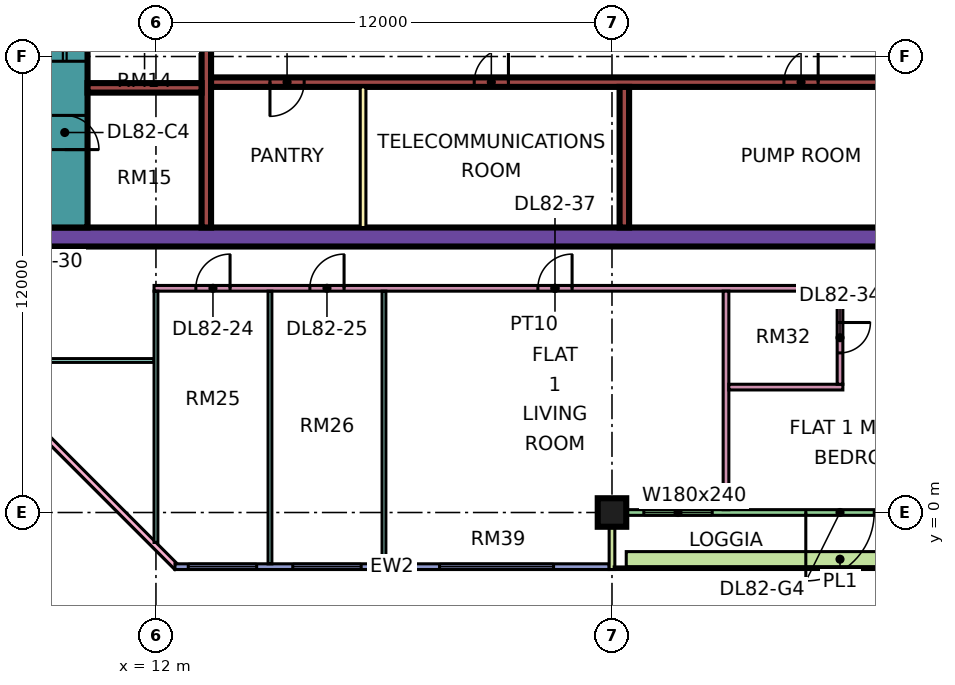
"""IFC4 building model, lengths in metres.
Left out: names, types, materials, properties, quantities, classifications, styles, units other than length and angle.
Written with IfcOpenShell. Run it as: python <this file> out.ifc"""

import sys

from ifc_helpers import new_model, si_unit, direction, frame, frame_2d, origin, origin_2d, place, context, subcontext, project, spatial, rectangle, extrude, element, fill, save


model = new_model("IFC4")
c1 = context("Model", 3, precision=1e-05, world=origin(), true_north=direction((0.0, 1.0)))
c2 = subcontext(c1, "Body", "Model", "MODEL_VIEW")
j1 = project(units=[si_unit("LENGTHUNIT", "METRE"), si_unit("PLANEANGLEUNIT", "RADIAN")], contexts=[c1])
p1 = place(None, origin())
s1 = spatial("IfcSite", under=j1, at=p1, CompositionType="ELEMENT")
p2 = place(p1, origin())
s2 = spatial("IfcBuilding", under=s1, at=p2, CompositionType="ELEMENT")
p3 = place(p2, frame((0.0, 0.0, 353.9)))
s3 = spatial("IfcBuildingStorey", under=s2, at=p3, CompositionType="ELEMENT", Elevation=353.9)
p4 = place(p3, frame((24.0, 0.0, 0.0), z_axis=(0.0, 0.0, 1.0), x_axis=(1.0, 0.0, 0.0)))
e1 = element("IfcColumn", 1, at=p4, inside=s3, PredefinedType="COLUMN", context=c2, shape_type="SweptSolid", body=[
    extrude(rectangle(XDim=0.75, YDim=0.75, at=origin_2d()), origin(), (0.0, 0.0, 1.0), 3.75),
])
p5 = place(p3, frame((9.0, 7.25, 0.0), z_axis=(0.0, 0.0, 1.0), x_axis=(1.0, 0.0, 0.0)))
e2 = element("IfcWall", 2, at=p5, inside=s3, PredefinedType="SHEAR", context=c2, shape_type="SweptSolid", body=[
    extrude(rectangle(XDim=25.0, YDim=0.5, at=frame_2d((12.5, 0.0))), origin(), (0.0, 0.0, 1.0), 3.75),
])
p6 = place(p3, frame((9.6, 7.5, 0.0), z_axis=(0.0, 0.0, 1.0), x_axis=(0.0, 1.0, 0.0)))
e3 = element("IfcWall", 3, at=p6, inside=s3, PredefinedType="SHEAR", context=c2, shape_type="SweptSolid", body=[
    extrude(rectangle(XDim=12.0, YDim=1.2, at=frame_2d((6.0, 0.0))), origin(), (0.0, 0.0, 1.0), 3.75),
])
p7 = place(p6, frame((4.375, 0.0, 0.0)))
e4 = element("IfcOpeningElement", 4, at=p7, cuts=e3, PredefinedType="OPENING", context=c2, shape_type="SweptSolid", body=[
    extrude(rectangle(XDim=1.1, YDim=2.2, at=frame_2d((0.55, 1.1))), frame((0.0, 0.61, 0.0), z_axis=(0.0, -1.0, 0.0), x_axis=(1.0, 0.0, 0.0)), (0.0, 0.0, 1.0), 1.22),
])
p8 = place(p6, frame((6.875, 0.0, 0.0)))
e5 = element("IfcOpeningElement", 5, at=p8, cuts=e3, PredefinedType="OPENING", context=c2, shape_type="SweptSolid", body=[
    extrude(rectangle(XDim=1.1, YDim=2.2, at=frame_2d((0.55, 1.1))), frame((0.0, 0.61, 0.0), z_axis=(0.0, -1.0, 0.0), x_axis=(1.0, 0.0, 0.0)), (0.0, 0.0, 1.0), 1.22),
])
p9 = place(p6, frame((9.85, 0.0, 0.0)))
e6 = element("IfcOpeningElement", 6, at=p9, cuts=e3, PredefinedType="OPENING", context=c2, shape_type="SweptSolid", body=[
    extrude(rectangle(XDim=1.1, YDim=2.2, at=frame_2d((0.55, 1.1))), frame((0.0, 0.61, 0.0), z_axis=(0.0, -1.0, 0.0), x_axis=(1.0, 0.0, 0.0)), (0.0, 0.0, 1.0), 1.22),
])
p10 = place(p6, frame((2.05, 0.0, 0.0)))
e7 = element("IfcOpeningElement", 7, at=p10, cuts=e3, PredefinedType="OPENING", context=c2, shape_type="SweptSolid", body=[
    extrude(rectangle(XDim=0.9, YDim=2.1, at=frame_2d((0.45, 1.05))), frame((0.0, 0.61, 0.0), z_axis=(0.0, -1.0, 0.0), x_axis=(1.0, 0.0, 0.0)), (0.0, 0.0, 1.0), 1.22),
])
p11 = place(p3, frame((13.325, 7.5, 0.0), z_axis=(0.0, 0.0, 1.0), x_axis=(0.0, 1.0, 0.0)))
e8 = element("IfcWall", 8, at=p11, inside=s3, PredefinedType="SHEAR", context=c2, shape_type="SweptSolid", body=[
    extrude(rectangle(XDim=12.0, YDim=0.25, at=frame_2d((6.0, 0.0))), origin(), (0.0, 0.0, 1.0), 3.75),
])
p12 = place(p3, frame((13.45, 11.325, 0.0), z_axis=(0.0, 0.0, 1.0), x_axis=(1.0, 0.0, 0.0)))
e9 = element("IfcWall", 9, at=p12, inside=s3, PredefinedType="SHEAR", context=c2, shape_type="SweptSolid", body=[
    extrude(rectangle(XDim=20.05, YDim=0.25, at=frame_2d((10.025, 0.0))), origin(), (0.0, 0.0, 1.0), 3.75),
])
p13 = place(p12, frame((1.55, 0.0, 0.0)))
e10 = element("IfcOpeningElement", 10, at=p13, cuts=e9, PredefinedType="OPENING", context=c2, shape_type="SweptSolid", body=[
    extrude(rectangle(XDim=0.9, YDim=2.1, at=frame_2d((0.45, 1.05))), frame((0.0, 0.135, 0.0), z_axis=(0.0, -1.0, 0.0), x_axis=(1.0, 0.0, 0.0)), (0.0, 0.0, 1.0), 0.27),
])
p14 = place(p12, frame((6.925, 0.0, 0.0)))
e11 = element("IfcOpeningElement", 11, at=p14, cuts=e9, PredefinedType="OPENING", context=c2, shape_type="SweptSolid", body=[
    extrude(rectangle(XDim=0.9, YDim=2.1, at=frame_2d((0.45, 1.05))), frame((0.0, 0.135, 0.0), z_axis=(0.0, -1.0, 0.0), x_axis=(1.0, 0.0, 0.0)), (0.0, 0.0, 1.0), 0.27),
])
p15 = place(p12, frame((15.075, 0.0, 0.0)))
e12 = element("IfcOpeningElement", 12, at=p15, cuts=e9, PredefinedType="OPENING", context=c2, shape_type="SweptSolid", body=[
    extrude(rectangle(XDim=0.9, YDim=2.1, at=frame_2d((0.45, 1.05))), frame((0.0, 0.135, 0.0), z_axis=(0.0, -1.0, 0.0), x_axis=(1.0, 0.0, 0.0)), (0.0, 0.0, 1.0), 0.27),
])
p16 = place(p3, frame((10.2, 11.175, 0.0), z_axis=(0.0, 0.0, 1.0), x_axis=(1.0, 0.0, 0.0)))
e13 = element("IfcWall", 13, at=p16, inside=s3, PredefinedType="SHEAR", context=c2, shape_type="SweptSolid", body=[
    extrude(rectangle(XDim=3.0, YDim=0.25, at=frame_2d((1.5, 0.0))), origin(), (0.0, 0.0, 1.0), 3.75),
])
p17 = place(p3, frame((24.325, 7.5, 0.0), z_axis=(0.0, 0.0, 1.0), x_axis=(0.0, 1.0, 0.0)))
e14 = element("IfcWall", 14, at=p17, inside=s3, PredefinedType="SHEAR", context=c2, shape_type="SweptSolid", body=[
    extrude(rectangle(XDim=3.7, YDim=0.25, at=frame_2d((1.85, 0.0))), origin(), (0.0, 0.0, 1.0), 3.75),
])
p18 = place(p3, frame((-1.447, 12.553, 0.0), z_axis=(0.0, 0.0, 1.0), x_axis=(0.707106781187, -0.707106781187, 0.0)))
e15 = element("IfcWall", 15, at=p18, inside=s3, PredefinedType="SOLIDWALL", context=c2, shape_type="SweptSolid", body=[
    extrude(rectangle(XDim=19.799, YDim=0.15, at=frame_2d((9.899, 0.0))), origin(), (0.0, 0.0, 1.0), 3.35),
])
p19 = place(p18, frame((2.212, 0.0, 0.45)))
e16 = element("IfcOpeningElement", 16, at=p19, cuts=e15, PredefinedType="OPENING", context=c2, shape_type="SweptSolid", body=[
    extrude(rectangle(XDim=3.0, YDim=2.4, at=frame_2d((1.5, 1.2))), frame((0.0, 0.085, 0.0), z_axis=(0.0, -1.0, 0.0), x_axis=(1.0, 0.0, 0.0)), (0.0, 0.0, 1.0), 0.17),
])
p20 = place(p18, frame((10.216, 0.0, 0.45)))
e17 = element("IfcOpeningElement", 17, at=p20, cuts=e15, PredefinedType="OPENING", context=c2, shape_type="SweptSolid", body=[
    extrude(rectangle(XDim=3.0, YDim=2.4, at=frame_2d((1.5, 1.2))), frame((0.0, 0.085, 0.0), z_axis=(0.0, -1.0, 0.0), x_axis=(1.0, 0.0, 0.0)), (0.0, 0.0, 1.0), 0.17),
])
p21 = place(p3, frame((12.5, -1.425, 0.0), z_axis=(0.0, 0.0, 1.0), x_axis=(1.0, 0.0, 0.0)))
e18 = element("IfcWall", 18, at=p21, inside=s3, PredefinedType="SOLIDWALL", context=c2, shape_type="SweptSolid", body=[
    extrude(rectangle(XDim=11.425, YDim=0.15, at=frame_2d((5.712, 0.0))), origin(), (0.0, 0.0, 1.0), 3.35),
])
p22 = place(p21, frame((0.35, 0.0, 0.45)))
e19 = element("IfcOpeningElement", 19, at=p22, cuts=e18, PredefinedType="OPENING", context=c2, shape_type="SweptSolid", body=[
    extrude(rectangle(XDim=1.8, YDim=2.4, at=frame_2d((0.9, 1.2))), frame((0.0, 0.085, 0.0), z_axis=(0.0, -1.0, 0.0), x_axis=(1.0, 0.0, 0.0)), (0.0, 0.0, 1.0), 0.17),
])
p23 = place(p21, frame((3.1, 0.0, 0.45)))
e20 = element("IfcOpeningElement", 20, at=p23, cuts=e18, PredefinedType="OPENING", context=c2, shape_type="SweptSolid", body=[
    extrude(rectangle(XDim=1.8, YDim=2.4, at=frame_2d((0.9, 1.2))), frame((0.0, 0.085, 0.0), z_axis=(0.0, -1.0, 0.0), x_axis=(1.0, 0.0, 0.0)), (0.0, 0.0, 1.0), 0.17),
])
p24 = place(p21, frame((6.962, 0.0, 0.45)))
e21 = element("IfcOpeningElement", 21, at=p24, cuts=e18, PredefinedType="OPENING", context=c2, shape_type="SweptSolid", body=[
    extrude(rectangle(XDim=3.0, YDim=2.4, at=frame_2d((1.5, 1.2))), frame((0.0, 0.085, 0.0), z_axis=(0.0, -1.0, 0.0), x_axis=(1.0, 0.0, 0.0)), (0.0, 0.0, 1.0), 0.17),
])
p25 = place(p3, frame((24.075, 0.0, 0.0), z_axis=(0.0, 0.0, 1.0), x_axis=(1.0, 0.0, 0.0)))
e22 = element("IfcWall", 22, at=p25, inside=s3, PredefinedType="SOLIDWALL", context=c2, shape_type="SweptSolid", body=[
    extrude(rectangle(XDim=11.85, YDim=0.15, at=frame_2d((5.925, 0.0))), origin(), (0.0, 0.0, 1.0), 3.35),
])
p26 = place(p25, frame((0.762, 0.0, 0.45)))
e23 = element("IfcOpeningElement", 23, at=p26, cuts=e22, PredefinedType="OPENING", context=c2, shape_type="SweptSolid", body=[
    extrude(rectangle(XDim=1.8, YDim=2.4, at=frame_2d((0.9, 1.2))), frame((0.0, 0.085, 0.0), z_axis=(0.0, -1.0, 0.0), x_axis=(1.0, 0.0, 0.0)), (0.0, 0.0, 1.0), 0.17),
])
p27 = place(p25, frame((5.025, 0.0, 0.0)))
e24 = element("IfcOpeningElement", 24, at=p27, cuts=e22, PredefinedType="OPENING", context=c2, shape_type="SweptSolid", body=[
    extrude(rectangle(XDim=1.8, YDim=2.4, at=frame_2d((0.9, 1.2))), frame((0.0, 0.085, 0.0), z_axis=(0.0, -1.0, 0.0), x_axis=(1.0, 0.0, 0.0)), (0.0, 0.0, 1.0), 0.17),
])
p28 = place(p25, frame((9.288, 0.0, 0.45)))
e25 = element("IfcOpeningElement", 25, at=p28, cuts=e22, PredefinedType="OPENING", context=c2, shape_type="SweptSolid", body=[
    extrude(rectangle(XDim=1.8, YDim=2.4, at=frame_2d((0.9, 1.2))), frame((0.0, 0.085, 0.0), z_axis=(0.0, -1.0, 0.0), x_axis=(1.0, 0.0, 0.0)), (0.0, 0.0, 1.0), 0.17),
])
p29 = place(p3, frame((24.0, -1.5, 0.0), z_axis=(0.0, 0.0, 1.0), x_axis=(0.0, 1.0, 0.0)))
e26 = element("IfcWall", 26, at=p29, inside=s3, PredefinedType="SOLIDWALL", context=c2, shape_type="SweptSolid", body=[
    extrude(rectangle(XDim=1.5, YDim=0.15, at=frame_2d((0.75, 0.0))), origin(), (0.0, 0.0, 1.0), 3.35),
])
p30 = place(p3, frame((24.375, -1.229, 0.0), z_axis=(0.0, 0.0, 1.0), x_axis=(1.0, 0.0, 0.0)))
e27 = element("IfcWall", 27, at=p30, inside=s3, PredefinedType="SOLIDWALL", context=c2, shape_type="SweptSolid", body=[
    extrude(rectangle(XDim=11.25, YDim=0.4, at=frame_2d((5.625, 0.0))), origin(), (0.0, 0.0, 1.0), 0.7),
])
p31 = place(p3, frame((17.45, 7.5, 0.0), z_axis=(0.0, 0.0, 1.0), x_axis=(0.0, 1.0, 0.0)))
e28 = element("IfcWall", 28, at=p31, inside=s3, PredefinedType="PARTITIONING", context=c2, shape_type="SweptSolid", body=[
    extrude(rectangle(XDim=3.7, YDim=0.15, at=frame_2d((1.85, 0.0))), origin(), (0.0, 0.0, 1.0), 3.35),
])
p32 = place(p3, frame((9.05, 4.0, 0.0), z_axis=(0.0, 0.0, 1.0), x_axis=(1.0, 0.0, 0.0)))
e29 = element("IfcWall", 29, at=p32, inside=s3, PredefinedType="PARTITIONING", context=c2, shape_type="SweptSolid", body=[
    extrude(rectangle(XDim=2.9, YDim=0.1, at=frame_2d((1.45, 0.0))), origin(), (0.0, 0.0, 1.0), 3.35),
])
p33 = place(p3, frame((11.95, 5.9, 0.0), z_axis=(0.0, 0.0, 1.0), x_axis=(1.0, 0.0, 0.0)))
e30 = element("IfcWall", 30, at=p33, inside=s3, PredefinedType="PARTITIONING", context=c2, shape_type="SweptSolid", body=[
    extrude(rectangle(XDim=21.1, YDim=0.15, at=frame_2d((10.55, 0.0))), origin(), (0.0, 0.0, 1.0), 3.35),
])
p34 = place(p33, frame((1.1, 0.0, 0.0)))
e31 = element("IfcOpeningElement", 31, at=p34, cuts=e30, PredefinedType="OPENING", context=c2, shape_type="SweptSolid", body=[
    extrude(rectangle(XDim=0.9, YDim=2.1, at=frame_2d((0.45, 1.05))), frame((0.0, 0.085, 0.0), z_axis=(0.0, -1.0, 0.0), x_axis=(1.0, 0.0, 0.0)), (0.0, 0.0, 1.0), 0.17),
])
p35 = place(p33, frame((4.1, 0.0, 0.0)))
e32 = element("IfcOpeningElement", 32, at=p35, cuts=e30, PredefinedType="OPENING", context=c2, shape_type="SweptSolid", body=[
    extrude(rectangle(XDim=0.9, YDim=2.1, at=frame_2d((0.45, 1.05))), frame((0.0, 0.085, 0.0), z_axis=(0.0, -1.0, 0.0), x_axis=(1.0, 0.0, 0.0)), (0.0, 0.0, 1.0), 0.17),
])
p36 = place(p33, frame((10.1, 0.0, 0.0)))
e33 = element("IfcOpeningElement", 33, at=p36, cuts=e30, PredefinedType="OPENING", context=c2, shape_type="SweptSolid", body=[
    extrude(rectangle(XDim=0.9, YDim=2.1, at=frame_2d((0.45, 1.05))), frame((0.0, 0.085, 0.0), z_axis=(0.0, -1.0, 0.0), x_axis=(1.0, 0.0, 0.0)), (0.0, 0.0, 1.0), 0.17),
])
p37 = place(p3, frame((12.0, -0.788, 0.0), z_axis=(0.0, 0.0, 1.0), x_axis=(0.0, 1.0, 0.0)))
e34 = element("IfcWall", 34, at=p37, inside=s3, PredefinedType="PARTITIONING", context=c2, shape_type="SweptSolid", body=[
    extrude(rectangle(XDim=6.613, YDim=0.1, at=frame_2d((3.306, 0.0))), origin(), (0.0, 0.0, 1.0), 3.35),
])
p38 = place(p3, frame((15.0, -1.351, 0.0), z_axis=(0.0, 0.0, 1.0), x_axis=(0.0, 1.0, 0.0)))
e35 = element("IfcWall", 35, at=p38, inside=s3, PredefinedType="PARTITIONING", context=c2, shape_type="SweptSolid", body=[
    extrude(rectangle(XDim=7.176, YDim=0.1, at=frame_2d((3.588, 0.0))), origin(), (0.0, 0.0, 1.0), 3.35),
])
p39 = place(p3, frame((18.0, -1.35, 0.0), z_axis=(0.0, 0.0, 1.0), x_axis=(0.0, 1.0, 0.0)))
e36 = element("IfcWall", 36, at=p39, inside=s3, PredefinedType="PARTITIONING", context=c2, shape_type="SweptSolid", body=[
    extrude(rectangle(XDim=7.175, YDim=0.1, at=frame_2d((3.587, 0.0))), origin(), (0.0, 0.0, 1.0), 3.35),
])
p40 = place(p3, frame((27.0, 0.074, 0.0), z_axis=(0.0, 0.0, 1.0), x_axis=(0.0, 1.0, 0.0)))
e37 = element("IfcWall", 37, at=p40, inside=s3, PredefinedType="PARTITIONING", context=c2, shape_type="SweptSolid", body=[
    extrude(rectangle(XDim=5.751, YDim=0.15, at=frame_2d((2.875, 0.0))), origin(), (0.0, 0.0, 1.0), 3.35),
])
p41 = place(p3, frame((27.075, 3.3, 0.0), z_axis=(0.0, 0.0, 1.0), x_axis=(1.0, 0.0, 0.0)))
e38 = element("IfcWall", 38, at=p41, inside=s3, PredefinedType="PARTITIONING", context=c2, shape_type="SweptSolid", body=[
    extrude(rectangle(XDim=3.0, YDim=0.15, at=frame_2d((1.5, 0.0))), origin(), (0.0, 0.0, 1.0), 3.35),
])
p42 = place(p3, frame((30.0, 3.375, 0.0), z_axis=(0.0, 0.0, 1.0), x_axis=(0.0, 1.0, 0.0)))
e39 = element("IfcWall", 39, at=p42, inside=s3, PredefinedType="PARTITIONING", context=c2, shape_type="SweptSolid", body=[
    extrude(rectangle(XDim=2.45, YDim=0.15, at=frame_2d((1.225, 0.0))), origin(), (0.0, 0.0, 1.0), 3.35),
])
p43 = place(p42, frame((0.825, 0.0, 0.0)))
e40 = element("IfcOpeningElement", 40, at=p43, cuts=e39, PredefinedType="OPENING", context=c2, shape_type="SweptSolid", body=[
    extrude(rectangle(XDim=0.8, YDim=2.1, at=frame_2d((0.4, 1.05))), frame((0.0, 0.085, 0.0), z_axis=(0.0, -1.0, 0.0), x_axis=(1.0, 0.0, 0.0)), (0.0, 0.0, 1.0), 0.17),
])
p44 = place(p22, origin())
e41 = element("IfcWindow", 41, at=p44, inside=s3, PartitioningType="SINGLE_PANEL", PredefinedType="WINDOW", context=c2, shape_type="SweptSolid", body=[
    extrude(rectangle(XDim=1.8, YDim=2.4, at=frame_2d((0.9, 1.2))), frame((0.0, 0.03, 0.0), z_axis=(0.0, -1.0, 0.0), x_axis=(1.0, 0.0, 0.0)), (0.0, 0.0, 1.0), 0.06),
])
fill(e19, e41)
p45 = place(p23, origin())
e42 = element("IfcWindow", 42, at=p45, inside=s3, PartitioningType="SINGLE_PANEL", PredefinedType="WINDOW", context=c2, shape_type="SweptSolid", body=[
    extrude(rectangle(XDim=1.8, YDim=2.4, at=frame_2d((0.9, 1.2))), frame((0.0, 0.03, 0.0), z_axis=(0.0, -1.0, 0.0), x_axis=(1.0, 0.0, 0.0)), (0.0, 0.0, 1.0), 0.06),
])
fill(e20, e42)
p46 = place(p24, origin())
e43 = element("IfcWindow", 43, at=p46, inside=s3, PartitioningType="SINGLE_PANEL", PredefinedType="WINDOW", context=c2, shape_type="SweptSolid", body=[
    extrude(rectangle(XDim=3.0, YDim=2.4, at=frame_2d((1.5, 1.2))), frame((0.0, 0.03, 0.0), z_axis=(0.0, -1.0, 0.0), x_axis=(1.0, 0.0, 0.0)), (0.0, 0.0, 1.0), 0.06),
])
fill(e21, e43)
p47 = place(p26, origin())
e44 = element("IfcWindow", 44, at=p47, inside=s3, PartitioningType="SINGLE_PANEL", PredefinedType="WINDOW", context=c2, shape_type="SweptSolid", body=[
    extrude(rectangle(XDim=1.8, YDim=2.4, at=frame_2d((0.9, 1.2))), frame((0.0, 0.03, 0.0), z_axis=(0.0, -1.0, 0.0), x_axis=(1.0, 0.0, 0.0)), (0.0, 0.0, 1.0), 0.06),
])
fill(e23, e44)
p48 = place(p27, frame((1.8, 0.0, 0.0), z_axis=(0.0, 0.0, 1.0), x_axis=(-1.0, 0.0, 0.0)))
e45 = element("IfcDoor", 45, at=p48, inside=s3, OperationType="DOUBLE_DOOR_SINGLE_SWING", PredefinedType="DOOR", context=c2, shape_type="SweptSolid", body=[
    extrude(rectangle(XDim=1.8, YDim=2.4, at=frame_2d((0.9, 1.2))), frame((0.0, 0.025, 0.0), z_axis=(0.0, -1.0, 0.0), x_axis=(1.0, 0.0, 0.0)), (0.0, 0.0, 1.0), 0.05),
])
fill(e24, e45)
p49 = place(p7, origin())
e46 = element("IfcDoor", 46, at=p49, inside=s3, OperationType="DOUBLE_DOOR_SLIDING", PredefinedType="DOOR", context=c2, shape_type="SweptSolid", body=[
    extrude(rectangle(XDim=1.1, YDim=2.2, at=frame_2d((0.55, 1.1))), frame((0.0, 0.025, 0.0), z_axis=(0.0, -1.0, 0.0), x_axis=(1.0, 0.0, 0.0)), (0.0, 0.0, 1.0), 0.05),
])
fill(e4, e46)
p50 = place(p10, frame((0.9, 0.0, 0.0), z_axis=(0.0, 0.0, 1.0), x_axis=(-1.0, 0.0, 0.0)))
e47 = element("IfcDoor", 47, at=p50, inside=s3, OperationType="SINGLE_SWING_LEFT", PredefinedType="DOOR", context=c2, shape_type="SweptSolid", body=[
    extrude(rectangle(XDim=0.9, YDim=2.1, at=frame_2d((0.45, 1.05))), frame((0.0, 0.025, 0.0), z_axis=(0.0, -1.0, 0.0), x_axis=(1.0, 0.0, 0.0)), (0.0, 0.0, 1.0), 0.05),
])
fill(e7, e47)
p51 = place(p13, frame((0.9, 0.0, 0.0), z_axis=(0.0, 0.0, 1.0), x_axis=(-1.0, 0.0, 0.0)))
e48 = element("IfcDoor", 48, at=p51, inside=s3, OperationType="SINGLE_SWING_LEFT", PredefinedType="DOOR", context=c2, shape_type="SweptSolid", body=[
    extrude(rectangle(XDim=0.9, YDim=2.1, at=frame_2d((0.45, 1.05))), frame((0.0, 0.025, 0.0), z_axis=(0.0, -1.0, 0.0), x_axis=(1.0, 0.0, 0.0)), (0.0, 0.0, 1.0), 0.05),
])
fill(e10, e48)
p52 = place(p14, frame((0.9, 0.0, 0.0), z_axis=(0.0, 0.0, 1.0), x_axis=(-1.0, 0.0, 0.0)))
e49 = element("IfcDoor", 49, at=p52, inside=s3, OperationType="SINGLE_SWING_RIGHT", PredefinedType="DOOR", context=c2, shape_type="SweptSolid", body=[
    extrude(rectangle(XDim=0.9, YDim=2.1, at=frame_2d((0.45, 1.05))), frame((0.0, 0.025, 0.0), z_axis=(0.0, -1.0, 0.0), x_axis=(1.0, 0.0, 0.0)), (0.0, 0.0, 1.0), 0.05),
])
fill(e11, e49)
p53 = place(p15, frame((0.9, 0.0, 0.0), z_axis=(0.0, 0.0, 1.0), x_axis=(-1.0, 0.0, 0.0)))
e50 = element("IfcDoor", 50, at=p53, inside=s3, OperationType="SINGLE_SWING_RIGHT", PredefinedType="DOOR", context=c2, shape_type="SweptSolid", body=[
    extrude(rectangle(XDim=0.9, YDim=2.1, at=frame_2d((0.45, 1.05))), frame((0.0, 0.025, 0.0), z_axis=(0.0, -1.0, 0.0), x_axis=(1.0, 0.0, 0.0)), (0.0, 0.0, 1.0), 0.05),
])
fill(e12, e50)
p54 = place(p34, frame((0.9, 0.0, 0.0), z_axis=(0.0, 0.0, 1.0), x_axis=(-1.0, 0.0, 0.0)))
e51 = element("IfcDoor", 51, at=p54, inside=s3, OperationType="SINGLE_SWING_RIGHT", PredefinedType="DOOR", context=c2, shape_type="SweptSolid", body=[
    extrude(rectangle(XDim=0.9, YDim=2.1, at=frame_2d((0.45, 1.05))), frame((0.0, 0.025, 0.0), z_axis=(0.0, -1.0, 0.0), x_axis=(1.0, 0.0, 0.0)), (0.0, 0.0, 1.0), 0.05),
])
fill(e31, e51)
p55 = place(p35, frame((0.9, 0.0, 0.0), z_axis=(0.0, 0.0, 1.0), x_axis=(-1.0, 0.0, 0.0)))
e52 = element("IfcDoor", 52, at=p55, inside=s3, OperationType="SINGLE_SWING_RIGHT", PredefinedType="DOOR", context=c2, shape_type="SweptSolid", body=[
    extrude(rectangle(XDim=0.9, YDim=2.1, at=frame_2d((0.45, 1.05))), frame((0.0, 0.025, 0.0), z_axis=(0.0, -1.0, 0.0), x_axis=(1.0, 0.0, 0.0)), (0.0, 0.0, 1.0), 0.05),
])
fill(e32, e52)
p56 = place(p43, origin())
e53 = element("IfcDoor", 53, at=p56, inside=s3, OperationType="SINGLE_SWING_RIGHT", PredefinedType="DOOR", context=c2, shape_type="SweptSolid", body=[
    extrude(rectangle(XDim=0.8, YDim=2.1, at=frame_2d((0.4, 1.05))), frame((0.0, 0.025, 0.0), z_axis=(0.0, -1.0, 0.0), x_axis=(1.0, 0.0, 0.0)), (0.0, 0.0, 1.0), 0.05),
])
fill(e40, e53)
p57 = place(p36, frame((0.9, 0.0, 0.0), z_axis=(0.0, 0.0, 1.0), x_axis=(-1.0, 0.0, 0.0)))
e54 = element("IfcDoor", 54, at=p57, inside=s3, OperationType="SINGLE_SWING_RIGHT", PredefinedType="DOOR", context=c2, shape_type="SweptSolid", body=[
    extrude(rectangle(XDim=0.9, YDim=2.1, at=frame_2d((0.45, 1.05))), frame((0.0, 0.025, 0.0), z_axis=(0.0, -1.0, 0.0), x_axis=(1.0, 0.0, 0.0)), (0.0, 0.0, 1.0), 0.05),
])
fill(e33, e54)
save(model, sys.argv[1])
